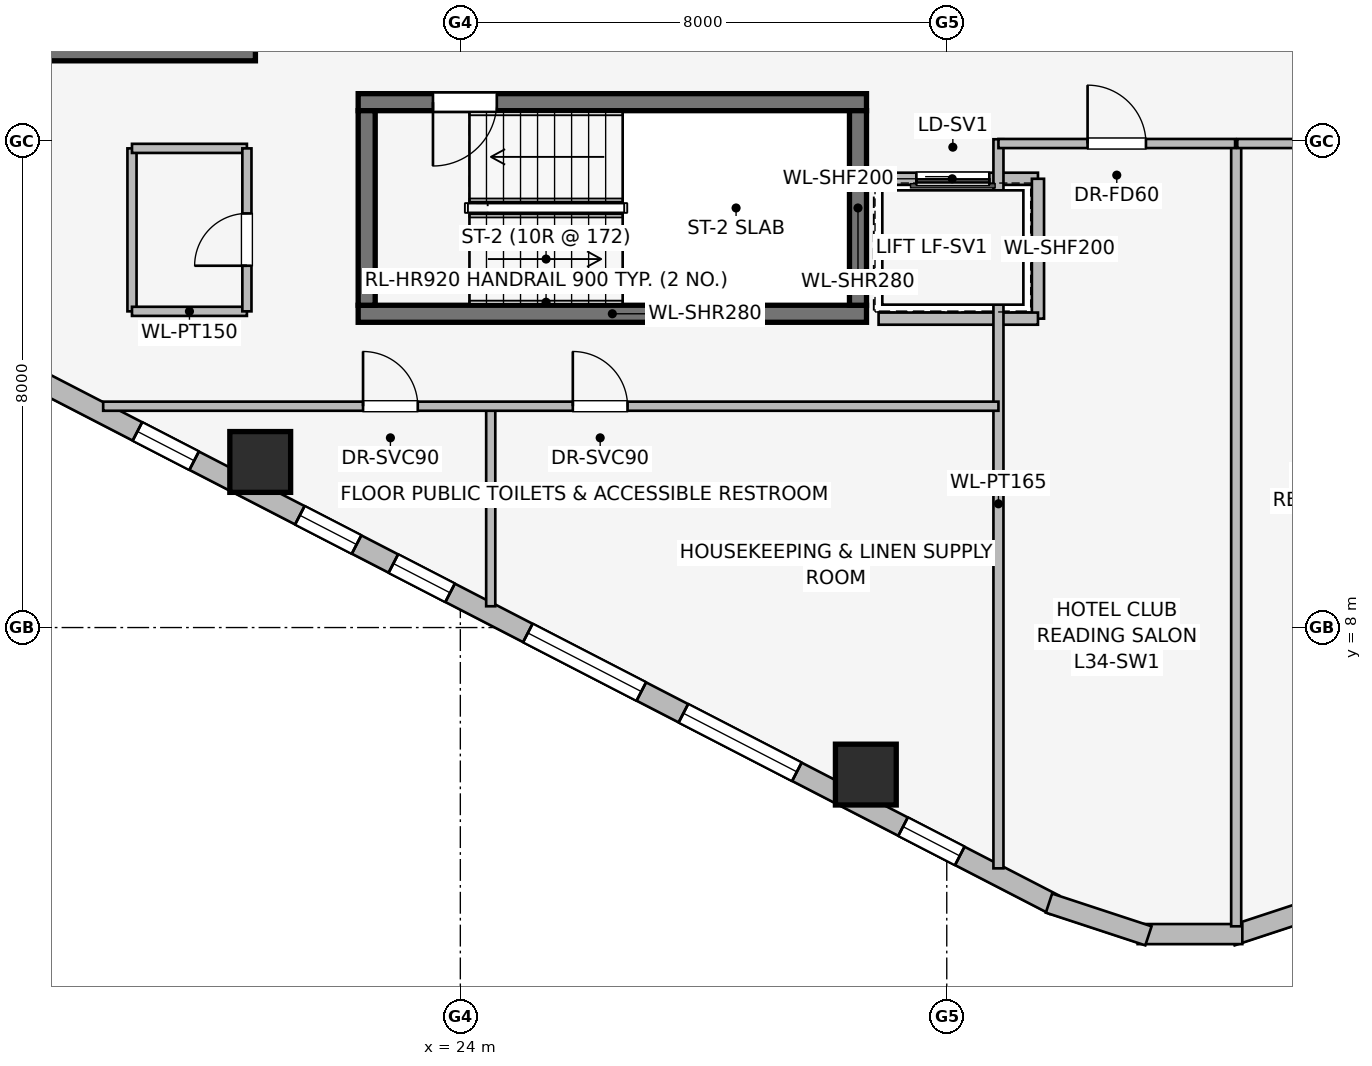
"""IFC4 building model, lengths in metres.
Left out: names, types, materials, properties, quantities, classifications, styles, units other than length and angle.
Written with IfcOpenShell. Run it as: python <this file> out.ifc"""

import sys

from ifc_helpers import new_model, si_unit, direction, frame, frame_2d, origin, origin_2d, place, context, subcontext, project, spatial, rectangle, extrude, element, fill, save


model = new_model("IFC4")
c1 = context("Model", 3, precision=1e-05, world=origin(), true_north=direction((0.0, 1.0)))
c2 = subcontext(c1, "Body", "Model", "MODEL_VIEW")
j1 = project(units=[si_unit("LENGTHUNIT", "METRE"), si_unit("PLANEANGLEUNIT", "RADIAN")], contexts=[c1])
p1 = place(None, origin())
s1 = spatial("IfcSite", under=j1, at=p1, CompositionType="ELEMENT")
p2 = place(p1, origin())
s2 = spatial("IfcBuilding", under=s1, at=p2, CompositionType="ELEMENT")
p3 = place(p2, frame((0.0, 0.0, 129.15)))
s3 = spatial("IfcBuildingStorey", under=s2, at=p3, CompositionType="ELEMENT", Elevation=129.15)
p4 = place(p3, frame((16.87, 17.46, 0.0), z_axis=(0.0, 0.0, 1.0), x_axis=(1.0, 0.0, 0.0)))
e1 = element("IfcWall", 1, at=p4, inside=s3, PredefinedType="SHEAR", context=c2, shape_type="SweptSolid", body=[
    extrude(rectangle(XDim=3.76, YDim=0.28, at=frame_2d((1.88, 0.0))), origin(), (0.0, 0.0, 1.0), 3.45),
])
p5 = place(p3, frame((22.32, 13.16, 0.0), z_axis=(0.0, 0.0, 1.0), x_axis=(1.0, 0.0, 0.0)))
e2 = element("IfcWall", 2, at=p5, inside=s3, PredefinedType="SHEAR", context=c2, shape_type="SweptSolid", body=[
    extrude(rectangle(XDim=8.36, YDim=0.28, at=frame_2d((4.18, 0.0))), origin(), (0.0, 0.0, 1.0), 3.45),
])
p6 = place(p3, frame((30.68, 16.64, 0.0), z_axis=(0.0, 0.0, 1.0), x_axis=(-1.0, 0.0, 0.0)))
e3 = element("IfcWall", 3, at=p6, inside=s3, PredefinedType="SHEAR", context=c2, shape_type="SweptSolid", body=[
    extrude(rectangle(XDim=8.36, YDim=0.28, at=frame_2d((4.18, 0.0))), origin(), (0.0, 0.0, 1.0), 3.45),
])
p7 = place(p6, frame((6.08, 0.0, 0.0)))
e4 = element("IfcOpeningElement", 4, at=p7, cuts=e3, PredefinedType="OPENING", context=c2, shape_type="SweptSolid", body=[
    extrude(rectangle(XDim=1.05, YDim=2.0, at=frame_2d((0.525, 1.0))), frame((0.0, 0.15, 0.0), z_axis=(0.0, -1.0, 0.0), x_axis=(1.0, 0.0, 0.0)), (0.0, 0.0, 1.0), 0.3),
])
for number, where, z_axis, x_axis in (
    (5, (22.46, 16.5, 0.0), (0.0, 0.0, 1.0), (0.0, -1.0, 0.0)),
    (6, (30.54, 13.3, 0.0), (0.0, 0.0, 1.0), (0.0, 1.0, 0.0)),
):
    element("IfcWall", number, at=place(p3, frame(where, z_axis=z_axis, x_axis=x_axis)), inside=s3, PredefinedType="SHEAR", context=c2, shape_type="SweptSolid", body=[
        extrude(rectangle(XDim=3.2, YDim=0.28, at=frame_2d((1.6, 0.0))), origin(), (0.0, 0.0, 1.0), 3.45),
    ])
for number, where, z_axis, x_axis in (
    (7, (20.709, 10.723, 0.0), (0.0, 0.0, 1.0), (1.0, 0.0, 0.0)),
    (8, (30.669, 5.582, 0.0), (0.0, 0.0, 1.0), (1.0, 0.0, 0.0)),
):
    element("IfcColumn", number, at=place(p3, frame(where, z_axis=z_axis, x_axis=x_axis)), inside=s3, PredefinedType="COLUMN", context=c2, shape_type="SweptSolid", body=[
        extrude(rectangle(XDim=1.0, YDim=1.0, at=origin_2d()), origin(), (0.0, 0.0, 1.0), 3.45),
    ])
p8 = place(p3, frame((17.243, 11.95, 0.0), z_axis=(0.0, 0.0, 1.0), x_axis=(-0.790621329885, 0.612305408053, 0.0)))
e9 = element("IfcWall", 9, at=p8, inside=s3, PredefinedType="STANDARD", context=c2, shape_type="SweptSolid", body=[
    extrude(rectangle(XDim=1.676, YDim=0.33, at=frame_2d((0.838, 0.0))), origin(), (0.0, 0.0, 1.0), 3.19),
])
p9 = place(p3, frame((33.769, 3.442, 0.0), z_axis=(0.0, 0.0, 1.0), x_axis=(-0.888613612362, 0.458656568606, 0.0)))
e10 = element("IfcWall", 10, at=p9, inside=s3, PredefinedType="STANDARD", context=c2, shape_type="SweptSolid", body=[
    extrude(rectangle(XDim=18.681, YDim=0.34, at=frame_2d((9.34, 0.0))), origin(), (0.0, 0.0, 1.0), 2.494),
])
p10 = place(p9, frame((1.75, 0.0, 0.75)))
e11 = element("IfcOpeningElement", 11, at=p10, cuts=e10, PredefinedType="OPENING", context=c2, shape_type="SweptSolid", body=[
    extrude(rectangle(XDim=1.05, YDim=1.4, at=frame_2d((0.525, 0.7))), frame((0.0, 0.18, 0.0), z_axis=(0.0, -1.0, 0.0), x_axis=(1.0, 0.0, 0.0)), (0.0, 0.0, 1.0), 0.36),
])
p11 = place(p9, frame((4.765, 0.0, 0.75)))
e12 = element("IfcOpeningElement", 12, at=p11, cuts=e10, PredefinedType="OPENING", context=c2, shape_type="SweptSolid", body=[
    extrude(rectangle(XDim=2.1, YDim=1.5, at=frame_2d((1.05, 0.75))), frame((0.0, 0.18, 0.0), z_axis=(0.0, -1.0, 0.0), x_axis=(1.0, 0.0, 0.0)), (0.0, 0.0, 1.0), 0.36),
])
p12 = place(p9, frame((7.644, 0.0, 0.75)))
e13 = element("IfcOpeningElement", 13, at=p12, cuts=e10, PredefinedType="OPENING", context=c2, shape_type="SweptSolid", body=[
    extrude(rectangle(XDim=2.1, YDim=1.5, at=frame_2d((1.05, 0.75))), frame((0.0, 0.18, 0.0), z_axis=(0.0, -1.0, 0.0), x_axis=(1.0, 0.0, 0.0)), (0.0, 0.0, 1.0), 0.36),
])
p13 = place(p9, frame((11.183, 0.0, 0.75)))
e14 = element("IfcOpeningElement", 14, at=p13, cuts=e10, PredefinedType="OPENING", context=c2, shape_type="SweptSolid", body=[
    extrude(rectangle(XDim=1.05, YDim=1.4, at=frame_2d((0.525, 0.7))), frame((0.0, 0.18, 0.0), z_axis=(0.0, -1.0, 0.0), x_axis=(1.0, 0.0, 0.0)), (0.0, 0.0, 1.0), 0.36),
])
p14 = place(p9, frame((12.914, 0.0, 0.75)))
e15 = element("IfcOpeningElement", 15, at=p14, cuts=e10, PredefinedType="OPENING", context=c2, shape_type="SweptSolid", body=[
    extrude(rectangle(XDim=1.05, YDim=1.4, at=frame_2d((0.525, 0.7))), frame((0.0, 0.18, 0.0), z_axis=(0.0, -1.0, 0.0), x_axis=(1.0, 0.0, 0.0)), (0.0, 0.0, 1.0), 0.36),
])
p15 = place(p9, frame((15.92, 0.0, 0.75)))
e16 = element("IfcOpeningElement", 16, at=p15, cuts=e10, PredefinedType="OPENING", context=c2, shape_type="SweptSolid", body=[
    extrude(rectangle(XDim=1.05, YDim=1.4, at=frame_2d((0.525, 0.7))), frame((0.0, 0.18, 0.0), z_axis=(0.0, -1.0, 0.0), x_axis=(1.0, 0.0, 0.0)), (0.0, 0.0, 1.0), 0.36),
])
for number, where, z_axis, x_axis in (
    (17, (38.319, 3.468, 0.0), (0.0, 0.0, 1.0), (-0.95, -0.312, 0.0)),
    (18, (36.861, 2.959, 0.0), (0.0, 0.0, 1.0), (-1.0, 0.0, 0.0)),
    (19, (35.317, 2.93, 0.0), (0.0, 0.0, 1.0), (-0.95, 0.312, 0.0)),
):
    element("IfcWall", number, at=place(p3, frame(where, z_axis=z_axis, x_axis=x_axis)), inside=s3, PredefinedType="STANDARD", context=c2, shape_type="SweptSolid", body=[
        extrude(rectangle(XDim=1.722, YDim=0.33, at=frame_2d((0.861, 0.0))), origin(), (0.0, 0.0, 1.0), 3.19),
    ])
p16 = place(p3, frame((33.5, 15.38, 0.0), z_axis=(0.0, 0.0, 1.0), x_axis=(-1.0, 0.0, 0.0)))
e20 = element("IfcWall", 20, at=p16, inside=s3, PredefinedType="PARTITIONING", context=c2, shape_type="SweptSolid", body=[
    extrude(rectangle(XDim=2.82, YDim=0.2, at=frame_2d((1.41, 0.0))), origin(), (0.0, 0.0, 1.0), 3.19),
])
p17 = place(p16, frame((0.8, 0.0, 0.0)))
e21 = element("IfcOpeningElement", 21, at=p17, cuts=e20, PredefinedType="OPENING", context=c2, shape_type="SweptSolid", body=[
    extrude(rectangle(XDim=1.2, YDim=2.2, at=frame_2d((0.6, 1.1))), frame((0.0, 0.11, 0.0), z_axis=(0.0, -1.0, 0.0), x_axis=(1.0, 0.0, 0.0)), (0.0, 0.0, 1.0), 0.22),
])
p18 = place(p3, frame((33.5, 13.08, 0.0), z_axis=(0.0, 0.0, 1.0), x_axis=(0.0, 1.0, 0.0)))
e22 = element("IfcWall", 22, at=p18, inside=s3, PredefinedType="PARTITIONING", context=c2, shape_type="SweptSolid", body=[
    extrude(rectangle(XDim=2.3, YDim=0.2, at=frame_2d((1.15, 0.0))), origin(), (0.0, 0.0, 1.0), 3.19),
])
p19 = place(p3, frame((30.879, 13.08, 0.0), z_axis=(0.0, 0.0, 1.0), x_axis=(1.0, 0.0, 0.0)))
e23 = element("IfcWall", 23, at=p19, inside=s3, PredefinedType="PARTITIONING", context=c2, shape_type="SweptSolid", body=[
    extrude(rectangle(XDim=2.621, YDim=0.2, at=frame_2d((1.311, 0.0))), origin(), (0.0, 0.0, 1.0), 3.19),
])
p20 = place(p3, frame((18.6, 15.88, 0.0), z_axis=(0.0, 0.0, 1.0), x_axis=(0.0, -1.0, 0.0)))
e24 = element("IfcWall", 24, at=p20, inside=s3, PredefinedType="PARTITIONING", context=c2, shape_type="SweptSolid", body=[
    extrude(rectangle(XDim=2.68, YDim=0.15, at=frame_2d((1.34, 0.0))), origin(), (0.0, 0.0, 1.0), 3.19),
])
for number, where, z_axis, x_axis in (
    (25, (18.6, 13.2, 0.0), (0.0, 0.0, 1.0), (1.0, 0.0, 0.0)),
    (26, (18.6, 15.88, 0.0), (0.0, 0.0, 1.0), (1.0, 0.0, 0.0)),
):
    element("IfcWall", number, at=place(p3, frame(where, z_axis=z_axis, x_axis=x_axis)), inside=s3, PredefinedType="PARTITIONING", context=c2, shape_type="SweptSolid", body=[
        extrude(rectangle(XDim=1.89, YDim=0.15, at=frame_2d((0.945, 0.0))), origin(), (0.0, 0.0, 1.0), 3.19),
    ])
p21 = place(p3, frame((20.49, 13.2, 0.0), z_axis=(0.0, 0.0, 1.0), x_axis=(0.0, 1.0, 0.0)))
e27 = element("IfcWall", 27, at=p21, inside=s3, PredefinedType="PARTITIONING", context=c2, shape_type="SweptSolid", body=[
    extrude(rectangle(XDim=2.68, YDim=0.15, at=frame_2d((1.34, 0.0))), origin(), (0.0, 0.0, 1.0), 3.19),
])
p22 = place(p21, frame((0.75, 0.0, 0.0)))
e28 = element("IfcOpeningElement", 28, at=p22, cuts=e27, PredefinedType="OPENING", context=c2, shape_type="SweptSolid", body=[
    extrude(rectangle(XDim=0.86, YDim=2.0, at=frame_2d((0.43, 1.0))), frame((0.0, 0.085, 0.0), z_axis=(0.0, -1.0, 0.0), x_axis=(1.0, 0.0, 0.0)), (0.0, 0.0, 1.0), 0.17),
])
p23 = place(p3, frame((32.85, 4.04, 0.0), z_axis=(0.0, 0.0, 1.0), x_axis=(0.0, 1.0, 0.0)))
e29 = element("IfcWall", 29, at=p23, inside=s3, PredefinedType="PARTITIONING", context=c2, shape_type="SweptSolid", body=[
    extrude(rectangle(XDim=11.99, YDim=0.165, at=frame_2d((5.995, 0.0))), origin(), (0.0, 0.0, 1.0), 3.19),
])
p24 = place(p3, frame((24.5, 8.35, 0.0), z_axis=(0.0, 0.0, 1.0), x_axis=(0.0, 1.0, 0.0)))
e30 = element("IfcWall", 30, at=p24, inside=s3, PredefinedType="PARTITIONING", context=c2, shape_type="SweptSolid", body=[
    extrude(rectangle(XDim=3.29, YDim=0.15, at=frame_2d((1.645, 0.0))), origin(), (0.0, 0.0, 1.0), 3.19),
])
p25 = place(p3, frame((18.126, 11.64, 0.0), z_axis=(0.0, 0.0, 1.0), x_axis=(1.0, 0.0, 0.0)))
e31 = element("IfcWall", 31, at=p25, inside=s3, PredefinedType="PARTITIONING", context=c2, shape_type="SweptSolid", body=[
    extrude(rectangle(XDim=14.724, YDim=0.15, at=frame_2d((7.362, 0.0))), origin(), (0.0, 0.0, 1.0), 3.19),
])
p26 = place(p25, frame((4.274, 0.0, 0.0)))
e32 = element("IfcOpeningElement", 32, at=p26, cuts=e31, PredefinedType="OPENING", context=c2, shape_type="SweptSolid", body=[
    extrude(rectangle(XDim=0.9, YDim=2.0, at=frame_2d((0.45, 1.0))), frame((0.0, 0.085, 0.0), z_axis=(0.0, -1.0, 0.0), x_axis=(1.0, 0.0, 0.0)), (0.0, 0.0, 1.0), 0.17),
])
p27 = place(p25, frame((7.724, 0.0, 0.0)))
e33 = element("IfcOpeningElement", 33, at=p27, cuts=e31, PredefinedType="OPENING", context=c2, shape_type="SweptSolid", body=[
    extrude(rectangle(XDim=0.9, YDim=2.0, at=frame_2d((0.45, 1.0))), frame((0.0, 0.085, 0.0), z_axis=(0.0, -1.0, 0.0), x_axis=(1.0, 0.0, 0.0)), (0.0, 0.0, 1.0), 0.17),
])
p28 = place(p3, frame((36.76, 3.087, 0.0), z_axis=(0.0, 0.0, 1.0), x_axis=(0.0, 1.0, 0.0)))
e34 = element("IfcWall", 34, at=p28, inside=s3, PredefinedType="PARTITIONING", context=c2, shape_type="SweptSolid", body=[
    extrude(rectangle(XDim=12.843, YDim=0.165, at=frame_2d((6.421, 0.0))), origin(), (0.0, 0.0, 1.0), 3.19),
])
p29 = place(p3, frame((32.85, 15.96, 0.0), z_axis=(0.0, 0.0, 1.0), x_axis=(1.0, 0.0, 0.0)))
e35 = element("IfcWall", 35, at=p29, inside=s3, PredefinedType="PARTITIONING", context=c2, shape_type="SweptSolid", body=[
    extrude(rectangle(XDim=3.892, YDim=0.15, at=frame_2d((1.946, 0.0))), origin(), (0.0, 0.0, 1.0), 3.19),
])
p30 = place(p29, frame((1.466, 0.0, 0.0)))
e36 = element("IfcOpeningElement", 36, at=p30, cuts=e35, PredefinedType="OPENING", context=c2, shape_type="SweptSolid", body=[
    extrude(rectangle(XDim=0.96, YDim=2.0, at=frame_2d((0.48, 1.0))), frame((0.0, 0.085, 0.0), z_axis=(0.0, -1.0, 0.0), x_axis=(1.0, 0.0, 0.0)), (0.0, 0.0, 1.0), 0.17),
])
p31 = place(p3, frame((36.778, 15.96, 0.0), z_axis=(0.0, 0.0, 1.0), x_axis=(1.0, 0.0, 0.0)))
e37 = element("IfcWall", 37, at=p31, inside=s3, PredefinedType="PARTITIONING", context=c2, shape_type="SweptSolid", body=[
    extrude(rectangle(XDim=3.803, YDim=0.15, at=frame_2d((1.901, 0.0))), origin(), (0.0, 0.0, 1.0), 3.19),
])
p32 = place(p31, frame((1.422, 0.0, 0.0)))
e38 = element("IfcOpeningElement", 38, at=p32, cuts=e37, PredefinedType="OPENING", context=c2, shape_type="SweptSolid", body=[
    extrude(rectangle(XDim=0.96, YDim=2.0, at=frame_2d((0.48, 1.0))), frame((0.0, 0.085, 0.0), z_axis=(0.0, -1.0, 0.0), x_axis=(1.0, 0.0, 0.0)), (0.0, 0.0, 1.0), 0.17),
])
p33 = place(p10, origin())
e39 = element("IfcWindow", 39, at=p33, inside=s3, PartitioningType="SINGLE_PANEL", PredefinedType="WINDOW", context=c2, shape_type="SweptSolid", body=[
    extrude(rectangle(XDim=1.05, YDim=1.4, at=frame_2d((0.525, 0.7))), frame((0.0, 0.03, 0.0), z_axis=(0.0, -1.0, 0.0), x_axis=(1.0, 0.0, 0.0)), (0.0, 0.0, 1.0), 0.06),
])
fill(e11, e39)
p34 = place(p11, origin())
e40 = element("IfcWindow", 40, at=p34, inside=s3, PartitioningType="SINGLE_PANEL", PredefinedType="WINDOW", context=c2, shape_type="SweptSolid", body=[
    extrude(rectangle(XDim=2.1, YDim=1.5, at=frame_2d((1.05, 0.75))), frame((0.0, 0.03, 0.0), z_axis=(0.0, -1.0, 0.0), x_axis=(1.0, 0.0, 0.0)), (0.0, 0.0, 1.0), 0.06),
])
fill(e12, e40)
p35 = place(p12, origin())
e41 = element("IfcWindow", 41, at=p35, inside=s3, PartitioningType="SINGLE_PANEL", PredefinedType="WINDOW", context=c2, shape_type="SweptSolid", body=[
    extrude(rectangle(XDim=2.1, YDim=1.5, at=frame_2d((1.05, 0.75))), frame((0.0, 0.03, 0.0), z_axis=(0.0, -1.0, 0.0), x_axis=(1.0, 0.0, 0.0)), (0.0, 0.0, 1.0), 0.06),
])
fill(e13, e41)
p36 = place(p13, origin())
e42 = element("IfcWindow", 42, at=p36, inside=s3, PartitioningType="SINGLE_PANEL", PredefinedType="WINDOW", context=c2, shape_type="SweptSolid", body=[
    extrude(rectangle(XDim=1.05, YDim=1.4, at=frame_2d((0.525, 0.7))), frame((0.0, 0.03, 0.0), z_axis=(0.0, -1.0, 0.0), x_axis=(1.0, 0.0, 0.0)), (0.0, 0.0, 1.0), 0.06),
])
fill(e14, e42)
p37 = place(p14, origin())
e43 = element("IfcWindow", 43, at=p37, inside=s3, PartitioningType="SINGLE_PANEL", PredefinedType="WINDOW", context=c2, shape_type="SweptSolid", body=[
    extrude(rectangle(XDim=1.05, YDim=1.4, at=frame_2d((0.525, 0.7))), frame((0.0, 0.03, 0.0), z_axis=(0.0, -1.0, 0.0), x_axis=(1.0, 0.0, 0.0)), (0.0, 0.0, 1.0), 0.06),
])
fill(e15, e43)
p38 = place(p15, origin())
e44 = element("IfcWindow", 44, at=p38, inside=s3, PartitioningType="SINGLE_PANEL", PredefinedType="WINDOW", context=c2, shape_type="SweptSolid", body=[
    extrude(rectangle(XDim=1.05, YDim=1.4, at=frame_2d((0.525, 0.7))), frame((0.0, 0.03, 0.0), z_axis=(0.0, -1.0, 0.0), x_axis=(1.0, 0.0, 0.0)), (0.0, 0.0, 1.0), 0.06),
])
fill(e16, e44)
p39 = place(p7, origin())
e45 = element("IfcDoor", 45, at=p39, inside=s3, OperationType="SINGLE_SWING_RIGHT", PredefinedType="DOOR", context=c2, shape_type="SweptSolid", body=[
    extrude(rectangle(XDim=1.05, YDim=2.0, at=frame_2d((0.525, 1.0))), frame((0.0, 0.025, 0.0), z_axis=(0.0, -1.0, 0.0), x_axis=(1.0, 0.0, 0.0)), (0.0, 0.0, 1.0), 0.05),
])
fill(e4, e45)
p40 = place(p17, origin())
e46 = element("IfcDoor", 46, at=p40, inside=s3, OperationType="SLIDING_TO_RIGHT", PredefinedType="DOOR", context=c2, shape_type="SweptSolid", body=[
    extrude(rectangle(XDim=1.2, YDim=2.2, at=frame_2d((0.6, 1.1))), frame((0.0, 0.025, 0.0), z_axis=(0.0, -1.0, 0.0), x_axis=(1.0, 0.0, 0.0)), (0.0, 0.0, 1.0), 0.05),
])
fill(e21, e46)
p41 = place(p22, origin())
e47 = element("IfcDoor", 47, at=p41, inside=s3, OperationType="SINGLE_SWING_LEFT", PredefinedType="DOOR", context=c2, shape_type="SweptSolid", body=[
    extrude(rectangle(XDim=0.86, YDim=2.0, at=frame_2d((0.43, 1.0))), frame((0.0, 0.025, 0.0), z_axis=(0.0, -1.0, 0.0), x_axis=(1.0, 0.0, 0.0)), (0.0, 0.0, 1.0), 0.05),
])
fill(e28, e47)
p42 = place(p26, origin())
e48 = element("IfcDoor", 48, at=p42, inside=s3, OperationType="SINGLE_SWING_LEFT", PredefinedType="DOOR", context=c2, shape_type="SweptSolid", body=[
    extrude(rectangle(XDim=0.9, YDim=2.0, at=frame_2d((0.45, 1.0))), frame((0.0, 0.025, 0.0), z_axis=(0.0, -1.0, 0.0), x_axis=(1.0, 0.0, 0.0)), (0.0, 0.0, 1.0), 0.05),
])
fill(e32, e48)
p43 = place(p27, origin())
e49 = element("IfcDoor", 49, at=p43, inside=s3, OperationType="SINGLE_SWING_LEFT", PredefinedType="DOOR", context=c2, shape_type="SweptSolid", body=[
    extrude(rectangle(XDim=0.9, YDim=2.0, at=frame_2d((0.45, 1.0))), frame((0.0, 0.025, 0.0), z_axis=(0.0, -1.0, 0.0), x_axis=(1.0, 0.0, 0.0)), (0.0, 0.0, 1.0), 0.05),
])
fill(e33, e49)
p44 = place(p30, origin())
e50 = element("IfcDoor", 50, at=p44, inside=s3, OperationType="SINGLE_SWING_LEFT", PredefinedType="DOOR", context=c2, shape_type="SweptSolid", body=[
    extrude(rectangle(XDim=0.96, YDim=2.0, at=frame_2d((0.48, 1.0))), frame((0.0, 0.025, 0.0), z_axis=(0.0, -1.0, 0.0), x_axis=(1.0, 0.0, 0.0)), (0.0, 0.0, 1.0), 0.05),
])
fill(e36, e50)
save(model, sys.argv[1])
